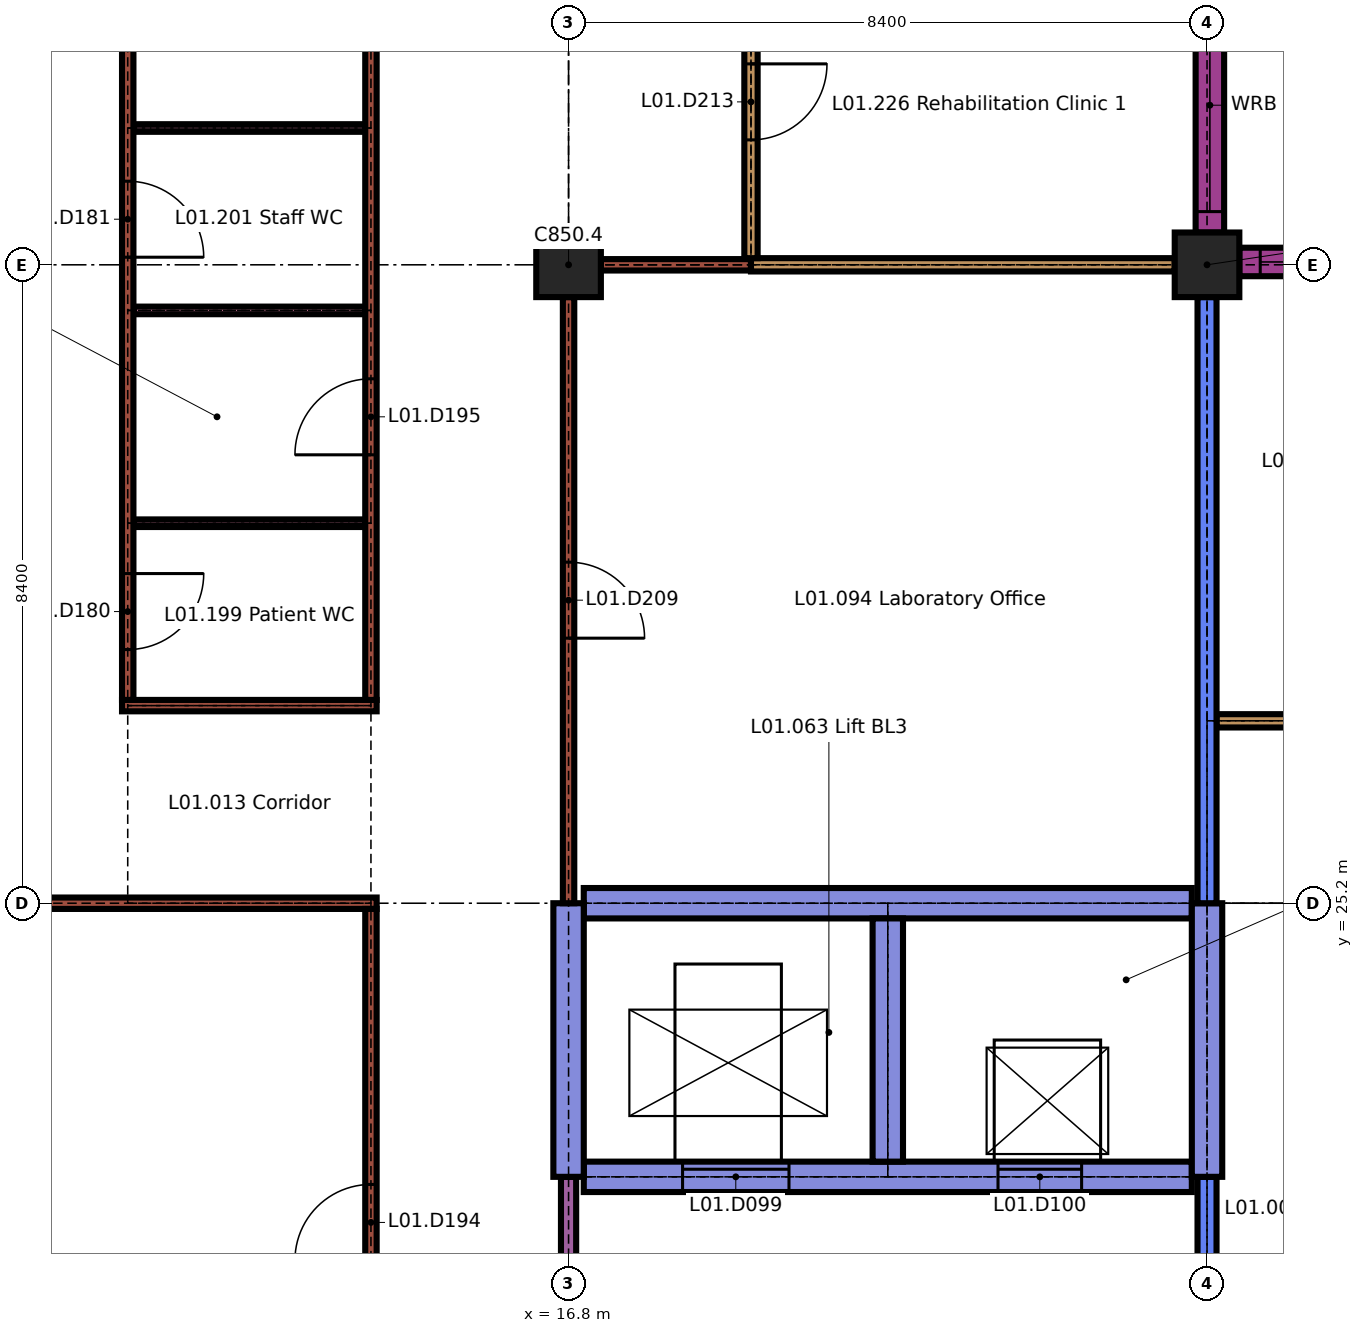
"""IFC4 building model, lengths in metres.
Left out: names, types, materials, properties, quantities, classifications, styles, units other than length and angle.
Written with IfcOpenShell. Run it as: python <this file> out.ifc"""

import sys

from ifc_helpers import new_model, si_unit, direction, frame, frame_2d, origin, origin_2d, place, context, subcontext, project, spatial, rectangle, extrude, element, fill, save


model = new_model("IFC4")
c1 = context("Model", 3, precision=1e-05, world=origin(), true_north=direction((0.0, 1.0)))
c2 = subcontext(c1, "Body", "Model", "MODEL_VIEW")
j1 = project(units=[si_unit("LENGTHUNIT", "METRE"), si_unit("PLANEANGLEUNIT", "RADIAN")], contexts=[c1])
p1 = place(None, origin())
s1 = spatial("IfcSite", under=j1, at=p1, CompositionType="ELEMENT")
p2 = place(p1, origin())
s2 = spatial("IfcBuilding", under=s1, at=p2, CompositionType="ELEMENT")
p3 = place(p2, frame((0.0, 0.0, 4.5)))
s3 = spatial("IfcBuildingStorey", under=s2, at=p3, CompositionType="ELEMENT", Elevation=4.5)
for number, where, z_axis, x_axis in (
    (1, (16.8, 33.6, 0.0), (0.0, 0.0, 1.0), (1.0, 0.0, 0.0)),
    (2, (25.2, 33.6, 0.0), (0.0, 0.0, 1.0), (1.0, 0.0, 0.0)),
):
    element("IfcColumn", number, at=place(p3, frame(where, z_axis=z_axis, x_axis=x_axis)), inside=s3, PredefinedType="COLUMN", context=c2, shape_type="SweptSolid", body=[
        extrude(rectangle(XDim=0.85, YDim=0.85, at=origin_2d()), origin(), (0.0, 0.0, 1.0), 3.45),
    ])
p4 = place(p3, frame((25.625, 33.637, 0.0), z_axis=(0.0, 0.0, 1.0), x_axis=(1.0, 0.0, 0.0)))
e3 = element("IfcWall", 3, at=p4, inside=s3, PredefinedType="SOLIDWALL", context=c2, shape_type="SweptSolid", body=[
    extrude(rectangle(XDim=7.975, YDim=0.375, at=frame_2d((3.988, 0.0))), origin(), (0.0, 0.0, 1.0), 3.15),
])
p5 = place(p4, frame((0.275, 0.0, 1.0)))
e4 = element("IfcOpeningElement", 4, at=p5, cuts=e3, PredefinedType="OPENING", context=c2, shape_type="SweptSolid", body=[
    extrude(rectangle(XDim=2.8, YDim=1.2, at=frame_2d((1.4, 0.6))), frame((0.0, 0.198, 0.0), z_axis=(0.0, -1.0, 0.0), x_axis=(1.0, 0.0, 0.0)), (0.0, 0.0, 1.0), 0.395),
])
p6 = place(p4, frame((4.475, 0.0, 1.0)))
e5 = element("IfcOpeningElement", 5, at=p6, cuts=e3, PredefinedType="OPENING", context=c2, shape_type="SweptSolid", body=[
    extrude(rectangle(XDim=2.8, YDim=1.2, at=frame_2d((1.4, 0.6))), frame((0.0, 0.198, 0.0), z_axis=(0.0, -1.0, 0.0), x_axis=(1.0, 0.0, 0.0)), (0.0, 0.0, 1.0), 0.395),
])
p7 = place(p3, frame((25.238, 34.025, 0.0), z_axis=(0.0, 0.0, 1.0), x_axis=(0.0, 1.0, 0.0)))
e6 = element("IfcWall", 6, at=p7, inside=s3, PredefinedType="SOLIDWALL", context=c2, shape_type="SweptSolid", body=[
    extrude(rectangle(XDim=3.775, YDim=0.375, at=frame_2d((1.888, 0.0))), origin(), (0.0, 0.0, 1.0), 3.15),
])
p8 = place(p7, frame((0.275, 0.0, 1.0)))
e7 = element("IfcOpeningElement", 7, at=p8, cuts=e6, PredefinedType="OPENING", context=c2, shape_type="SweptSolid", body=[
    extrude(rectangle(XDim=2.8, YDim=1.2, at=frame_2d((1.4, 0.6))), frame((0.0, 0.198, 0.0), z_axis=(0.0, -1.0, 0.0), x_axis=(1.0, 0.0, 0.0)), (0.0, 0.0, 1.0), 0.395),
])
p9 = place(p3, frame((17.0, 21.6, 0.0), z_axis=(0.0, 0.0, 1.0), x_axis=(1.0, 0.0, 0.0)))
e8 = element("IfcWall", 8, at=p9, inside=s3, PredefinedType="SHEAR", context=c2, shape_type="SweptSolid", body=[
    extrude(rectangle(XDim=8.0, YDim=0.4, at=frame_2d((4.0, 0.0))), origin(), (0.0, 0.0, 1.0), 3.45),
])
p10 = place(p9, frame((1.3, 0.0, 0.0)))
e9 = element("IfcOpeningElement", 9, at=p10, cuts=e8, PredefinedType="OPENING", context=c2, shape_type="SweptSolid", body=[
    extrude(rectangle(XDim=1.4, YDim=2.1, at=frame_2d((0.7, 1.05))), frame((0.0, 0.21, 0.0), z_axis=(0.0, -1.0, 0.0), x_axis=(1.0, 0.0, 0.0)), (0.0, 0.0, 1.0), 0.42),
])
p11 = place(p9, frame((5.45, 0.0, 0.0)))
e10 = element("IfcOpeningElement", 10, at=p11, cuts=e8, PredefinedType="OPENING", context=c2, shape_type="SweptSolid", body=[
    extrude(rectangle(XDim=1.1, YDim=2.1, at=frame_2d((0.55, 1.05))), frame((0.0, 0.21, 0.0), z_axis=(0.0, -1.0, 0.0), x_axis=(1.0, 0.0, 0.0)), (0.0, 0.0, 1.0), 0.42),
])
p12 = place(p3, frame((8.4, 25.2, 0.0), z_axis=(0.0, 0.0, 1.0), x_axis=(1.0, 0.0, 0.0)))
e11 = element("IfcWall", 11, at=p12, inside=s3, PredefinedType="PARTITIONING", context=c2, shape_type="SweptSolid", body=[
    extrude(rectangle(XDim=5.875, YDim=0.15, at=frame_2d((2.938, 0.0))), origin(), (0.0, 0.0, 1.0), 3.45),
])
p13 = place(p3, frame((17.0, 25.2, 0.0), z_axis=(0.0, 0.0, 1.0), x_axis=(1.0, 0.0, 0.0)))
e12 = element("IfcWall", 12, at=p13, inside=s3, PredefinedType="SHEAR", context=c2, shape_type="SweptSolid", body=[
    extrude(rectangle(XDim=8.0, YDim=0.4, at=frame_2d((4.0, 0.0))), origin(), (0.0, 0.0, 1.0), 3.45),
])
p14 = place(p3, frame((25.325, 27.6, 0.0), z_axis=(0.0, 0.0, 1.0), x_axis=(1.0, 0.0, 0.0)))
e13 = element("IfcWall", 13, at=p14, inside=s3, PredefinedType="PARTITIONING", context=c2, shape_type="SweptSolid", body=[
    extrude(rectangle(XDim=8.175, YDim=0.175, at=frame_2d((4.087, 0.0))), origin(), (0.0, 0.0, 1.0), 3.45),
])
p15 = place(p14, frame((3.387, 0.0, 0.0)))
e14 = element("IfcOpeningElement", 14, at=p15, cuts=e13, PredefinedType="OPENING", context=c2, shape_type="SweptSolid", body=[
    extrude(rectangle(XDim=1.4, YDim=2.1, at=frame_2d((0.7, 1.05))), frame((0.0, 0.097, 0.0), z_axis=(0.0, -1.0, 0.0), x_axis=(1.0, 0.0, 0.0)), (0.0, 0.0, 1.0), 0.195),
])
p16 = place(p3, frame((10.925, 27.8, 0.0), z_axis=(0.0, 0.0, 1.0), x_axis=(1.0, 0.0, 0.0)))
e15 = element("IfcWall", 15, at=p16, inside=s3, PredefinedType="PARTITIONING", context=c2, shape_type="SweptSolid", body=[
    extrude(rectangle(XDim=3.35, YDim=0.15, at=frame_2d((1.675, 0.0))), origin(), (0.0, 0.0, 1.0), 3.45),
])
for number, where, z_axis, x_axis in (
    (16, (11.075, 30.2, 0.0), (0.0, 0.0, 1.0), (1.0, 0.0, 0.0)),
    (17, (11.075, 33.0, 0.0), (0.0, 0.0, 1.0), (1.0, 0.0, 0.0)),
):
    element("IfcWall", number, at=place(p3, frame(where, z_axis=z_axis, x_axis=x_axis)), inside=s3, PredefinedType="PARTITIONING", context=c2, shape_type="SweptSolid", body=[
        extrude(rectangle(XDim=3.05, YDim=0.1, at=frame_2d((1.525, 0.0))), origin(), (0.0, 0.0, 1.0), 3.45),
    ])
p17 = place(p3, frame((17.225, 33.6, 0.0), z_axis=(0.0, 0.0, 1.0), x_axis=(1.0, 0.0, 0.0)))
e18 = element("IfcWall", 18, at=p17, inside=s3, PredefinedType="PARTITIONING", context=c2, shape_type="SweptSolid", body=[
    extrude(rectangle(XDim=1.975, YDim=0.15, at=frame_2d((0.987, 0.0))), origin(), (0.0, 0.0, 1.0), 3.45),
])
p18 = place(p3, frame((19.2, 33.6, 0.0), z_axis=(0.0, 0.0, 1.0), x_axis=(1.0, 0.0, 0.0)))
e19 = element("IfcWall", 19, at=p18, inside=s3, PredefinedType="PARTITIONING", context=c2, shape_type="SweptSolid", body=[
    extrude(rectangle(XDim=5.575, YDim=0.175, at=frame_2d((2.788, 0.0))), origin(), (0.0, 0.0, 1.0), 3.45),
])
p19 = place(p3, frame((11.075, 35.4, 0.0), z_axis=(0.0, 0.0, 1.0), x_axis=(1.0, 0.0, 0.0)))
e20 = element("IfcWall", 20, at=p19, inside=s3, PredefinedType="PARTITIONING", context=c2, shape_type="SweptSolid", body=[
    extrude(rectangle(XDim=3.05, YDim=0.1, at=frame_2d((1.525, 0.0))), origin(), (0.0, 0.0, 1.0), 3.45),
])
p20 = place(p3, frame((11.0, 27.875, 0.0), z_axis=(0.0, 0.0, 1.0), x_axis=(0.0, 1.0, 0.0)))
e21 = element("IfcWall", 21, at=p20, inside=s3, PredefinedType="PARTITIONING", context=c2, shape_type="SweptSolid", body=[
    extrude(rectangle(XDim=26.65, YDim=0.15, at=frame_2d((13.325, 0.0))), origin(), (0.0, 0.0, 1.0), 3.45),
])
p21 = place(p20, frame((0.663, 0.0, 0.0)))
e22 = element("IfcOpeningElement", 22, at=p21, cuts=e21, PredefinedType="OPENING", context=c2, shape_type="SweptSolid", body=[
    extrude(rectangle(XDim=1.0, YDim=2.1, at=frame_2d((0.5, 1.05))), frame((0.0, 0.085, 0.0), z_axis=(0.0, -1.0, 0.0), x_axis=(1.0, 0.0, 0.0)), (0.0, 0.0, 1.0), 0.17),
])
p22 = place(p20, frame((5.825, 0.0, 0.0)))
e23 = element("IfcOpeningElement", 23, at=p22, cuts=e21, PredefinedType="OPENING", context=c2, shape_type="SweptSolid", body=[
    extrude(rectangle(XDim=1.0, YDim=2.1, at=frame_2d((0.5, 1.05))), frame((0.0, 0.085, 0.0), z_axis=(0.0, -1.0, 0.0), x_axis=(1.0, 0.0, 0.0)), (0.0, 0.0, 1.0), 0.17),
])
p23 = place(p20, frame((12.125, 0.0, 0.0)))
e24 = element("IfcOpeningElement", 24, at=p23, cuts=e21, PredefinedType="OPENING", context=c2, shape_type="SweptSolid", body=[
    extrude(rectangle(XDim=1.0, YDim=2.1, at=frame_2d((0.5, 1.05))), frame((0.0, 0.085, 0.0), z_axis=(0.0, -1.0, 0.0), x_axis=(1.0, 0.0, 0.0)), (0.0, 0.0, 1.0), 0.17),
])
p24 = place(p20, frame((19.125, 0.0, 0.0)))
e25 = element("IfcOpeningElement", 25, at=p24, cuts=e21, PredefinedType="OPENING", context=c2, shape_type="SweptSolid", body=[
    extrude(rectangle(XDim=1.0, YDim=2.1, at=frame_2d((0.5, 1.05))), frame((0.0, 0.085, 0.0), z_axis=(0.0, -1.0, 0.0), x_axis=(1.0, 0.0, 0.0)), (0.0, 0.0, 1.0), 0.17),
])
p25 = place(p20, frame((24.887, 0.0, 0.0)))
e26 = element("IfcOpeningElement", 26, at=p25, cuts=e21, PredefinedType="OPENING", context=c2, shape_type="SweptSolid", body=[
    extrude(rectangle(XDim=1.0, YDim=2.1, at=frame_2d((0.5, 1.05))), frame((0.0, 0.085, 0.0), z_axis=(0.0, -1.0, 0.0), x_axis=(1.0, 0.0, 0.0)), (0.0, 0.0, 1.0), 0.17),
])
p26 = place(p3, frame((14.2, 16.875, 0.0), z_axis=(0.0, 0.0, 1.0), x_axis=(0.0, 1.0, 0.0)))
e27 = element("IfcWall", 27, at=p26, inside=s3, PredefinedType="PARTITIONING", context=c2, shape_type="SweptSolid", body=[
    extrude(rectangle(XDim=8.25, YDim=0.15, at=frame_2d((4.125, 0.0))), origin(), (0.0, 0.0, 1.0), 3.45),
])
p27 = place(p26, frame((3.625, 0.0, 0.0)))
e28 = element("IfcOpeningElement", 28, at=p27, cuts=e27, PredefinedType="OPENING", context=c2, shape_type="SweptSolid", body=[
    extrude(rectangle(XDim=1.0, YDim=2.1, at=frame_2d((0.5, 1.05))), frame((0.0, 0.085, 0.0), z_axis=(0.0, -1.0, 0.0), x_axis=(1.0, 0.0, 0.0)), (0.0, 0.0, 1.0), 0.17),
])
p28 = place(p3, frame((14.2, 27.875, 0.0), z_axis=(0.0, 0.0, 1.0), x_axis=(0.0, 1.0, 0.0)))
e29 = element("IfcWall", 29, at=p28, inside=s3, PredefinedType="PARTITIONING", context=c2, shape_type="SweptSolid", body=[
    extrude(rectangle(XDim=26.65, YDim=0.15, at=frame_2d((13.325, 0.0))), origin(), (0.0, 0.0, 1.0), 3.45),
])
p29 = place(p28, frame((3.225, 0.0, 0.0)))
e30 = element("IfcOpeningElement", 30, at=p29, cuts=e29, PredefinedType="OPENING", context=c2, shape_type="SweptSolid", body=[
    extrude(rectangle(XDim=1.0, YDim=2.1, at=frame_2d((0.5, 1.05))), frame((0.0, 0.085, 0.0), z_axis=(0.0, -1.0, 0.0), x_axis=(1.0, 0.0, 0.0)), (0.0, 0.0, 1.0), 0.17),
])
p30 = place(p28, frame((8.825, 0.0, 0.0)))
e31 = element("IfcOpeningElement", 31, at=p30, cuts=e29, PredefinedType="OPENING", context=c2, shape_type="SweptSolid", body=[
    extrude(rectangle(XDim=1.0, YDim=2.1, at=frame_2d((0.5, 1.05))), frame((0.0, 0.085, 0.0), z_axis=(0.0, -1.0, 0.0), x_axis=(1.0, 0.0, 0.0)), (0.0, 0.0, 1.0), 0.17),
])
p31 = place(p28, frame((15.625, 0.0, 0.0)))
e32 = element("IfcOpeningElement", 32, at=p31, cuts=e29, PredefinedType="OPENING", context=c2, shape_type="SweptSolid", body=[
    extrude(rectangle(XDim=1.0, YDim=2.1, at=frame_2d((0.5, 1.05))), frame((0.0, 0.085, 0.0), z_axis=(0.0, -1.0, 0.0), x_axis=(1.0, 0.0, 0.0)), (0.0, 0.0, 1.0), 0.17),
])
p32 = place(p28, frame((22.125, 0.0, 0.0)))
e33 = element("IfcOpeningElement", 33, at=p32, cuts=e29, PredefinedType="OPENING", context=c2, shape_type="SweptSolid", body=[
    extrude(rectangle(XDim=1.0, YDim=2.1, at=frame_2d((0.5, 1.05))), frame((0.0, 0.085, 0.0), z_axis=(0.0, -1.0, 0.0), x_axis=(1.0, 0.0, 0.0)), (0.0, 0.0, 1.0), 0.17),
])
p33 = place(p3, frame((16.8, 16.9, 0.0), z_axis=(0.0, 0.0, 1.0), x_axis=(0.0, 1.0, 0.0)))
e34 = element("IfcWall", 34, at=p33, inside=s3, PredefinedType="PARTITIONING", context=c2, shape_type="SweptSolid", body=[
    extrude(rectangle(XDim=4.7, YDim=0.2, at=frame_2d((2.35, 0.0))), origin(), (0.0, 0.0, 1.0), 3.45),
])
p34 = place(p33, frame((1.45, 0.0, 0.0)))
e35 = element("IfcOpeningElement", 35, at=p34, cuts=e34, PredefinedType="OPENING", context=c2, shape_type="SweptSolid", body=[
    extrude(rectangle(XDim=1.8, YDim=2.4, at=frame_2d((0.9, 1.2))), frame((0.0, 0.11, 0.0), z_axis=(0.0, -1.0, 0.0), x_axis=(1.0, 0.0, 0.0)), (0.0, 0.0, 1.0), 0.22),
])
p35 = place(p3, frame((16.8, 21.6, 0.0), z_axis=(0.0, 0.0, 1.0), x_axis=(0.0, 1.0, 0.0)))
e36 = element("IfcWall", 36, at=p35, inside=s3, PredefinedType="SHEAR", context=c2, shape_type="SweptSolid", body=[
    extrude(rectangle(XDim=3.6, YDim=0.4, at=frame_2d((1.8, 0.0))), origin(), (0.0, 0.0, 1.0), 3.45),
])
p36 = place(p3, frame((16.8, 25.2, 0.0), z_axis=(0.0, 0.0, 1.0), x_axis=(0.0, 1.0, 0.0)))
e37 = element("IfcWall", 37, at=p36, inside=s3, PredefinedType="PARTITIONING", context=c2, shape_type="SweptSolid", body=[
    extrude(rectangle(XDim=7.975, YDim=0.15, at=frame_2d((3.988, 0.0))), origin(), (0.0, 0.0, 1.0), 3.45),
])
p37 = place(p36, frame((3.488, 0.0, 0.0)))
e38 = element("IfcOpeningElement", 38, at=p37, cuts=e37, PredefinedType="OPENING", context=c2, shape_type="SweptSolid", body=[
    extrude(rectangle(XDim=1.0, YDim=2.1, at=frame_2d((0.5, 1.05))), frame((0.0, 0.085, 0.0), z_axis=(0.0, -1.0, 0.0), x_axis=(1.0, 0.0, 0.0)), (0.0, 0.0, 1.0), 0.17),
])
p38 = place(p3, frame((19.2, 33.688, 0.0), z_axis=(0.0, 0.0, 1.0), x_axis=(0.0, 1.0, 0.0)))
e39 = element("IfcWall", 39, at=p38, inside=s3, PredefinedType="PARTITIONING", context=c2, shape_type="SweptSolid", body=[
    extrude(rectangle(XDim=8.212, YDim=0.175, at=frame_2d((4.106, 0.0))), origin(), (0.0, 0.0, 1.0), 3.45),
])
p39 = place(p38, frame((1.556, 0.0, 0.0)))
e40 = element("IfcOpeningElement", 40, at=p39, cuts=e39, PredefinedType="OPENING", context=c2, shape_type="SweptSolid", body=[
    extrude(rectangle(XDim=1.0, YDim=2.1, at=frame_2d((0.5, 1.05))), frame((0.0, 0.097, 0.0), z_axis=(0.0, -1.0, 0.0), x_axis=(1.0, 0.0, 0.0)), (0.0, 0.0, 1.0), 0.195),
])
p40 = place(p38, frame((5.663, 0.0, 0.0)))
e41 = element("IfcOpeningElement", 41, at=p40, cuts=e39, PredefinedType="OPENING", context=c2, shape_type="SweptSolid", body=[
    extrude(rectangle(XDim=1.0, YDim=2.1, at=frame_2d((0.5, 1.05))), frame((0.0, 0.097, 0.0), z_axis=(0.0, -1.0, 0.0), x_axis=(1.0, 0.0, 0.0)), (0.0, 0.0, 1.0), 0.195),
])
p41 = place(p3, frame((21.0, 21.8, 0.0), z_axis=(0.0, 0.0, 1.0), x_axis=(0.0, 1.0, 0.0)))
e42 = element("IfcWall", 42, at=p41, inside=s3, PredefinedType="SHEAR", context=c2, shape_type="SweptSolid", body=[
    extrude(rectangle(XDim=3.2, YDim=0.4, at=frame_2d((1.6, 0.0))), origin(), (0.0, 0.0, 1.0), 3.45),
])
p42 = place(p3, frame((25.2, 14.275, 0.0), z_axis=(0.0, 0.0, 1.0), x_axis=(0.0, 1.0, 0.0)))
e43 = element("IfcWall", 43, at=p42, inside=s3, PredefinedType="SOLIDWALL", context=c2, shape_type="SweptSolid", body=[
    extrude(rectangle(XDim=7.325, YDim=0.25, at=frame_2d((3.663, 0.0))), origin(), (0.0, 0.0, 1.0), 3.45),
])
p43 = place(p42, frame((0.363, 0.0, 0.0)))
e44 = element("IfcOpeningElement", 44, at=p43, cuts=e43, PredefinedType="OPENING", context=c2, shape_type="SweptSolid", body=[
    extrude(rectangle(XDim=1.8, YDim=2.4, at=frame_2d((0.9, 1.2))), frame((0.0, 0.135, 0.0), z_axis=(0.0, -1.0, 0.0), x_axis=(1.0, 0.0, 0.0)), (0.0, 0.0, 1.0), 0.27),
])
p44 = place(p42, frame((4.025, 0.0, 0.0)))
e45 = element("IfcOpeningElement", 45, at=p44, cuts=e43, PredefinedType="OPENING", context=c2, shape_type="SweptSolid", body=[
    extrude(rectangle(XDim=1.8, YDim=2.4, at=frame_2d((0.9, 1.2))), frame((0.0, 0.135, 0.0), z_axis=(0.0, -1.0, 0.0), x_axis=(1.0, 0.0, 0.0)), (0.0, 0.0, 1.0), 0.27),
])
p45 = place(p3, frame((25.2, 21.6, 0.0), z_axis=(0.0, 0.0, 1.0), x_axis=(0.0, 1.0, 0.0)))
e46 = element("IfcWall", 46, at=p45, inside=s3, PredefinedType="SHEAR", context=c2, shape_type="SweptSolid", body=[
    extrude(rectangle(XDim=3.6, YDim=0.4, at=frame_2d((1.8, 0.0))), origin(), (0.0, 0.0, 1.0), 3.45),
])
p46 = place(p3, frame((25.2, 25.2, 0.0), z_axis=(0.0, 0.0, 1.0), x_axis=(0.0, 1.0, 0.0)))
e47 = element("IfcWall", 47, at=p46, inside=s3, PredefinedType="SOLIDWALL", context=c2, shape_type="SweptSolid", body=[
    extrude(rectangle(XDim=7.975, YDim=0.25, at=frame_2d((3.988, 0.0))), origin(), (0.0, 0.0, 1.0), 3.45),
])
p47 = place(p5, origin())
e48 = element("IfcWindow", 48, at=p47, inside=s3, PartitioningType="DOUBLE_PANEL_VERTICAL", PredefinedType="WINDOW", context=c2, shape_type="SweptSolid", body=[
    extrude(rectangle(XDim=2.8, YDim=1.2, at=frame_2d((1.4, 0.6))), frame((0.0, 0.03, 0.0), z_axis=(0.0, -1.0, 0.0), x_axis=(1.0, 0.0, 0.0)), (0.0, 0.0, 1.0), 0.06),
])
fill(e4, e48)
p48 = place(p8, origin())
e49 = element("IfcWindow", 49, at=p48, inside=s3, PartitioningType="DOUBLE_PANEL_VERTICAL", PredefinedType="WINDOW", context=c2, shape_type="SweptSolid", body=[
    extrude(rectangle(XDim=2.8, YDim=1.2, at=frame_2d((1.4, 0.6))), frame((0.0, 0.03, 0.0), z_axis=(0.0, -1.0, 0.0), x_axis=(1.0, 0.0, 0.0)), (0.0, 0.0, 1.0), 0.06),
])
fill(e7, e49)
p49 = place(p10, origin())
e50 = element("IfcDoor", 50, at=p49, inside=s3, OperationType="SLIDING_TO_LEFT", PredefinedType="DOOR", context=c2, shape_type="SweptSolid", body=[
    extrude(rectangle(XDim=1.4, YDim=2.1, at=frame_2d((0.7, 1.05))), frame((0.0, 0.025, 0.0), z_axis=(0.0, -1.0, 0.0), x_axis=(1.0, 0.0, 0.0)), (0.0, 0.0, 1.0), 0.05),
])
fill(e9, e50)
p50 = place(p11, origin())
e51 = element("IfcDoor", 51, at=p50, inside=s3, OperationType="SLIDING_TO_LEFT", PredefinedType="DOOR", context=c2, shape_type="SweptSolid", body=[
    extrude(rectangle(XDim=1.1, YDim=2.1, at=frame_2d((0.55, 1.05))), frame((0.0, 0.025, 0.0), z_axis=(0.0, -1.0, 0.0), x_axis=(1.0, 0.0, 0.0)), (0.0, 0.0, 1.0), 0.05),
])
fill(e10, e51)
p51 = place(p21, origin())
e52 = element("IfcDoor", 52, at=p51, inside=s3, OperationType="SINGLE_SWING_RIGHT", PredefinedType="DOOR", context=c2, shape_type="SweptSolid", body=[
    extrude(rectangle(XDim=1.0, YDim=2.1, at=frame_2d((0.5, 1.05))), frame((0.0, 0.025, 0.0), z_axis=(0.0, -1.0, 0.0), x_axis=(1.0, 0.0, 0.0)), (0.0, 0.0, 1.0), 0.05),
])
fill(e22, e52)
p52 = place(p22, origin())
e53 = element("IfcDoor", 53, at=p52, inside=s3, OperationType="SINGLE_SWING_LEFT", PredefinedType="DOOR", context=c2, shape_type="SweptSolid", body=[
    extrude(rectangle(XDim=1.0, YDim=2.1, at=frame_2d((0.5, 1.05))), frame((0.0, 0.025, 0.0), z_axis=(0.0, -1.0, 0.0), x_axis=(1.0, 0.0, 0.0)), (0.0, 0.0, 1.0), 0.05),
])
fill(e23, e53)
p53 = place(p27, origin())
e54 = element("IfcDoor", 54, at=p53, inside=s3, OperationType="SINGLE_SWING_RIGHT", PredefinedType="DOOR", context=c2, shape_type="SweptSolid", body=[
    extrude(rectangle(XDim=1.0, YDim=2.1, at=frame_2d((0.5, 1.05))), frame((0.0, 0.025, 0.0), z_axis=(0.0, -1.0, 0.0), x_axis=(1.0, 0.0, 0.0)), (0.0, 0.0, 1.0), 0.05),
])
fill(e28, e54)
p54 = place(p29, origin())
e55 = element("IfcDoor", 55, at=p54, inside=s3, OperationType="SINGLE_SWING_RIGHT", PredefinedType="DOOR", context=c2, shape_type="SweptSolid", body=[
    extrude(rectangle(XDim=1.0, YDim=2.1, at=frame_2d((0.5, 1.05))), frame((0.0, 0.025, 0.0), z_axis=(0.0, -1.0, 0.0), x_axis=(1.0, 0.0, 0.0)), (0.0, 0.0, 1.0), 0.05),
])
fill(e30, e55)
p55 = place(p37, origin())
e56 = element("IfcDoor", 56, at=p55, inside=s3, OperationType="SINGLE_SWING_LEFT", PredefinedType="DOOR", context=c2, shape_type="SweptSolid", body=[
    extrude(rectangle(XDim=1.0, YDim=2.1, at=frame_2d((0.5, 1.05))), frame((0.0, 0.025, 0.0), z_axis=(0.0, -1.0, 0.0), x_axis=(1.0, 0.0, 0.0)), (0.0, 0.0, 1.0), 0.05),
])
fill(e38, e56)
p56 = place(p39, origin())
e57 = element("IfcDoor", 57, at=p56, inside=s3, OperationType="SINGLE_SWING_RIGHT", PredefinedType="DOOR", context=c2, shape_type="SweptSolid", body=[
    extrude(rectangle(XDim=1.0, YDim=2.1, at=frame_2d((0.5, 1.05))), frame((0.0, 0.035, 0.0), z_axis=(0.0, -1.0, 0.0), x_axis=(1.0, 0.0, 0.0)), (0.0, 0.0, 1.0), 0.07),
])
fill(e40, e57)
save(model, sys.argv[1])
